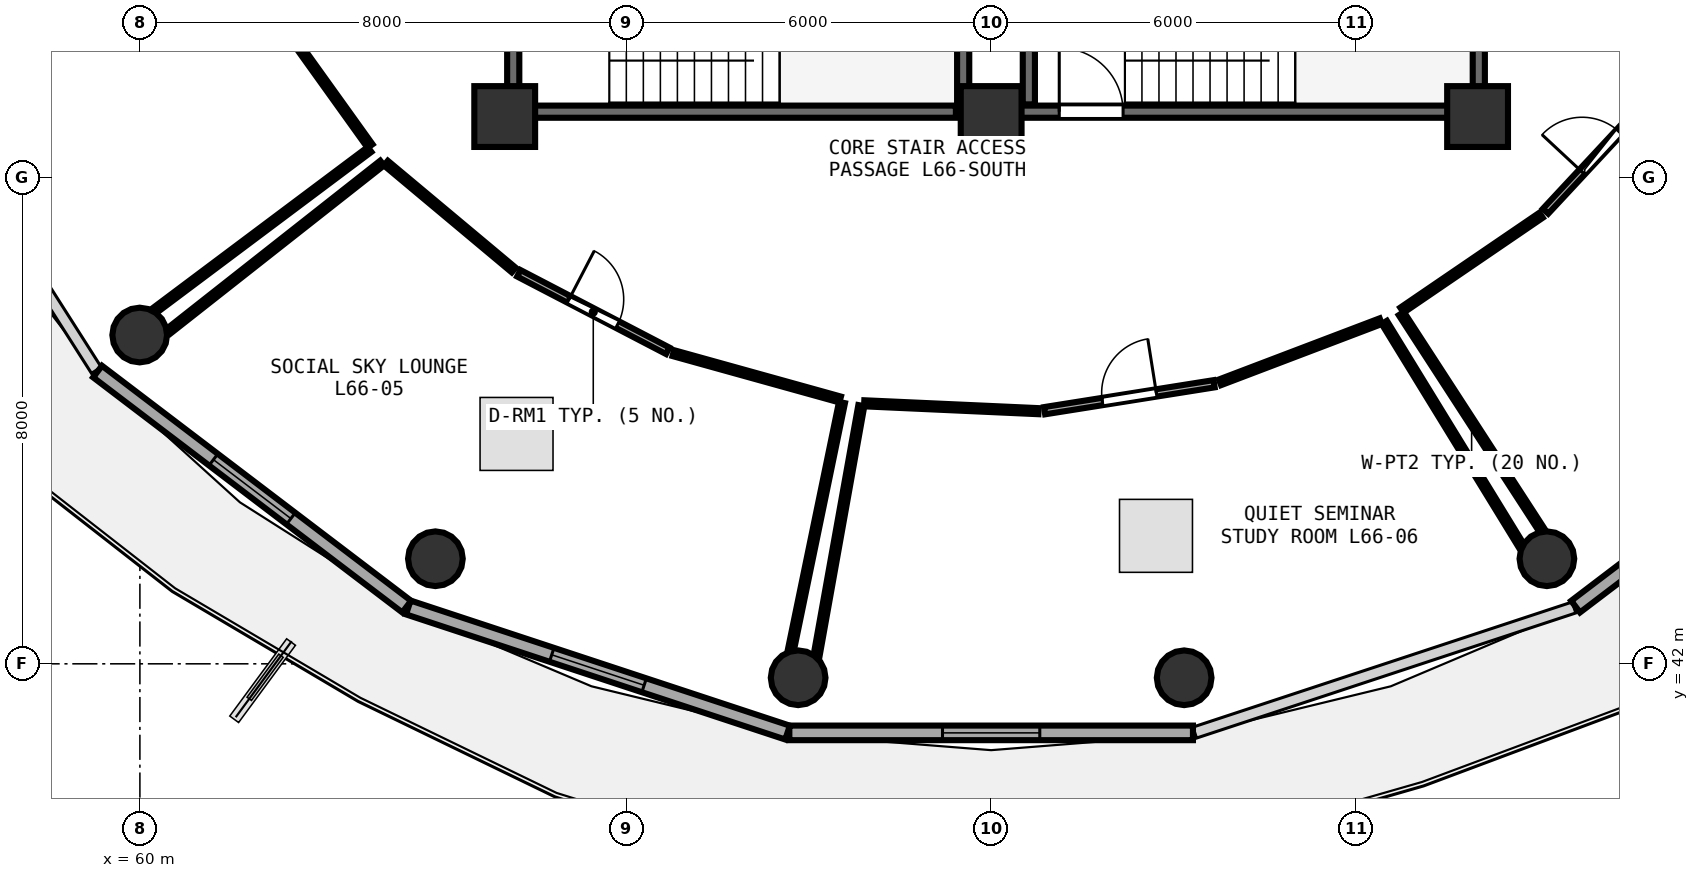
"""IFC4 building model, lengths in metres.
Left out: names, types, materials, properties, quantities, classifications, styles, units other than length and angle.
Written with IfcOpenShell. Run it as: python <this file> out.ifc"""

import sys

from ifc_helpers import new_model, si_unit, direction, frame, frame_2d, origin, origin_2d, place, context, subcontext, project, spatial, rectangle, circle, extrude, element, fill, save


model = new_model("IFC4")
c1 = context("Model", 3, precision=1e-05, world=origin(), true_north=direction((0.0, 1.0)))
c2 = subcontext(c1, "Body", "Model", "MODEL_VIEW")
j1 = project(units=[si_unit("LENGTHUNIT", "METRE"), si_unit("PLANEANGLEUNIT", "RADIAN")], contexts=[c1])
p1 = place(None, origin())
s1 = spatial("IfcSite", under=j1, at=p1, CompositionType="ELEMENT")
p2 = place(p1, origin())
s2 = spatial("IfcBuilding", under=s1, at=p2, CompositionType="ELEMENT")
p3 = place(p2, frame((0.0, 0.0, 259.95)))
s3 = spatial("IfcBuildingStorey", under=s2, at=p3, CompositionType="ELEMENT", Elevation=259.95)
for number, where, z_axis, x_axis in (
    (1, (66.0, 51.0, 0.0), (0.0, 0.0, 1.0), (1.0, 0.0, 0.0)),
    (2, (74.0, 51.0, 0.0), (0.0, 0.0, 1.0), (1.0, 0.0, 0.0)),
    (3, (82.0, 51.0, 0.0), (0.0, 0.0, 1.0), (1.0, 0.0, 0.0)),
):
    element("IfcColumn", number, at=place(p3, frame(where, z_axis=z_axis, x_axis=x_axis)), inside=s3, PredefinedType="PILASTER", context=c2, shape_type="SweptSolid", body=[
        extrude(rectangle(XDim=1.0, YDim=1.0, at=origin_2d()), origin(), (0.0, 0.0, 1.0), 3.75),
    ])
for number, where, z_axis, x_axis in (
    (4, (59.997, 47.407, 0.0), (0.0, 0.0, 1.0), (1.0, 0.0, 0.0)),
    (5, (64.86, 43.728, 0.0), (0.0, 0.0, 1.0), (1.0, 0.0, 0.0)),
    (6, (70.826, 41.771, 0.0), (0.0, 0.0, 1.0), (1.0, 0.0, 0.0)),
    (7, (77.174, 41.771, 0.0), (0.0, 0.0, 1.0), (1.0, 0.0, 0.0)),
    (8, (83.14, 43.728, 0.0), (0.0, 0.0, 1.0), (1.0, 0.0, 0.0)),
):
    element("IfcColumn", number, at=place(p3, frame(where, z_axis=z_axis, x_axis=x_axis)), inside=s3, PredefinedType="COLUMN", context=c2, shape_type="SweptSolid", body=[
        extrude(circle(Radius=0.45, at=origin_2d()), origin(), (0.0, 0.0, 1.0), 3.75),
    ])
p4 = place(p3, frame((59.304, 46.806, 0.0), z_axis=(0.0, 0.0, 1.0), x_axis=(0.796010444211, -0.605282886514, 0.0)))
e9 = element("IfcWall", 9, at=p4, inside=s3, PredefinedType="SOLIDWALL", context=c2, shape_type="SweptSolid", body=[
    extrude(rectangle(XDim=6.387, YDim=0.24, at=frame_2d((3.194, 0.0))), origin(), (0.0, 0.0, 1.0), 3.475),
])
p5 = place(p4, frame((2.394, 0.0, 0.85)))
e10 = element("IfcOpeningElement", 10, at=p5, cuts=e9, PredefinedType="OPENING", context=c2, shape_type="SweptSolid", body=[
    extrude(rectangle(XDim=1.6, YDim=1.45, at=frame_2d((0.8, 0.725))), frame((0.0, 0.13, 0.0), z_axis=(0.0, -1.0, 0.0), x_axis=(1.0, 0.0, 0.0)), (0.0, 0.0, 1.0), 0.26),
])
p6 = place(p3, frame((64.414, 42.927, 0.0), z_axis=(0.0, 0.0, 1.0), x_axis=(0.949663708393, -0.313271193954, 0.0)))
e11 = element("IfcWall", 11, at=p6, inside=s3, PredefinedType="SOLIDWALL", context=c2, shape_type="SweptSolid", body=[
    extrude(rectangle(XDim=6.568, YDim=0.24, at=frame_2d((3.284, 0.0))), origin(), (0.0, 0.0, 1.0), 3.475),
])
p7 = place(p6, frame((2.484, 0.0, 0.85)))
e12 = element("IfcOpeningElement", 12, at=p7, cuts=e11, PredefinedType="OPENING", context=c2, shape_type="SweptSolid", body=[
    extrude(rectangle(XDim=1.6, YDim=1.45, at=frame_2d((0.8, 0.725))), frame((0.0, 0.13, 0.0), z_axis=(0.0, -1.0, 0.0), x_axis=(1.0, 0.0, 0.0)), (0.0, 0.0, 1.0), 0.26),
])
p8 = place(p3, frame((70.681, 40.864, 0.0), z_axis=(0.0, 0.0, 1.0), x_axis=(1.0, 0.0, 0.0)))
e13 = element("IfcWall", 13, at=p8, inside=s3, PredefinedType="SOLIDWALL", context=c2, shape_type="SweptSolid", body=[
    extrude(rectangle(XDim=6.638, YDim=0.24, at=frame_2d((3.319, 0.0))), origin(), (0.0, 0.0, 1.0), 3.475),
])
p9 = place(p8, frame((2.519, 0.0, 0.85)))
e14 = element("IfcOpeningElement", 14, at=p9, cuts=e13, PredefinedType="OPENING", context=c2, shape_type="SweptSolid", body=[
    extrude(rectangle(XDim=1.6, YDim=1.45, at=frame_2d((0.8, 0.725))), frame((0.0, 0.13, 0.0), z_axis=(0.0, -1.0, 0.0), x_axis=(1.0, 0.0, 0.0)), (0.0, 0.0, 1.0), 0.26),
])
p10 = place(p3, frame((83.612, 42.94, 0.0), z_axis=(0.0, 0.0, 1.0), x_axis=(0.796010444211, 0.605282886514, 0.0)))
e15 = element("IfcWall", 15, at=p10, inside=s3, PredefinedType="SOLIDWALL", context=c2, shape_type="SweptSolid", body=[
    extrude(rectangle(XDim=6.387, YDim=0.24, at=frame_2d((3.194, 0.0))), origin(), (0.0, 0.0, 1.0), 3.475),
])
p11 = place(p10, frame((2.394, 0.0, 0.85)))
e16 = element("IfcOpeningElement", 16, at=p11, cuts=e15, PredefinedType="OPENING", context=c2, shape_type="SweptSolid", body=[
    extrude(rectangle(XDim=1.6, YDim=1.45, at=frame_2d((0.8, 0.725))), frame((0.0, 0.13, 0.0), z_axis=(0.0, -1.0, 0.0), x_axis=(1.0, 0.0, 0.0)), (0.0, 0.0, 1.0), 0.26),
])
p12 = place(p3, frame((74.0, 51.08, 0.0), z_axis=(0.0, 0.0, 1.0), x_axis=(1.0, 0.0, 0.0)))
e17 = element("IfcWall", 17, at=p12, inside=s3, PredefinedType="SHEAR", context=c2, shape_type="SweptSolid", body=[
    extrude(rectangle(XDim=7.9, YDim=0.2, at=frame_2d((3.95, 0.0))), origin(), (0.0, 0.0, 1.0), 3.49),
])
p13 = place(p12, frame((1.12, 0.0, 0.0)))
e18 = element("IfcOpeningElement", 18, at=p13, cuts=e17, PredefinedType="OPENING", context=c2, shape_type="SweptSolid", body=[
    extrude(rectangle(XDim=1.05, YDim=2.1, at=frame_2d((0.525, 1.05))), frame((0.0, 0.11, 0.0), z_axis=(0.0, -1.0, 0.0), x_axis=(1.0, 0.0, 0.0)), (0.0, 0.0, 1.0), 0.22),
])
for number, where, z_axis, x_axis in (
    (19, (82.02, 51.2, 0.0), (0.0, 0.0, 1.0), (0.0, 1.0, 0.0)),
    (20, (74.62, 54.27, 0.0), (0.0, 0.0, 1.0), (0.0, -1.0, 0.0)),
):
    element("IfcWall", number, at=place(p3, frame(where, z_axis=z_axis, x_axis=x_axis)), inside=s3, PredefinedType="SHEAR", context=c2, shape_type="SweptSolid", body=[
        extrude(rectangle(XDim=3.07, YDim=0.2, at=frame_2d((1.535, 0.0))), origin(), (0.0, 0.0, 1.0), 3.49),
    ])
p14 = place(p3, frame((66.26, 51.08, 0.0), z_axis=(0.0, 0.0, 1.0), x_axis=(1.0, 0.0, 0.0)))
e21 = element("IfcWall", 21, at=p14, inside=s3, PredefinedType="SHEAR", context=c2, shape_type="SweptSolid", body=[
    extrude(rectangle(XDim=7.16, YDim=0.2, at=frame_2d((3.58, 0.0))), origin(), (0.0, 0.0, 1.0), 3.49),
])
p15 = place(p3, frame((73.54, 51.2, 0.0), z_axis=(0.0, 0.0, 1.0), x_axis=(0.0, 1.0, 0.0)))
e22 = element("IfcWall", 22, at=p15, inside=s3, PredefinedType="SHEAR", context=c2, shape_type="SweptSolid", body=[
    extrude(rectangle(XDim=3.07, YDim=0.2, at=frame_2d((1.535, 0.0))), origin(), (0.0, 0.0, 1.0), 3.49),
])
p16 = place(p3, frame((66.14, 54.27, 0.0), z_axis=(0.0, 0.0, 1.0), x_axis=(0.0, -1.0, 0.0)))
e23 = element("IfcWall", 23, at=p16, inside=s3, PredefinedType="SHEAR", context=c2, shape_type="SweptSolid", body=[
    extrude(rectangle(XDim=3.07, YDim=0.2, at=frame_2d((1.535, 0.0))), origin(), (0.0, 0.0, 1.0), 3.49),
])
p17 = place(p16, frame((1.01, 0.0, 0.0)))
e24 = element("IfcOpeningElement", 24, at=p17, cuts=e23, PredefinedType="OPENING", context=c2, shape_type="SweptSolid", body=[
    extrude(rectangle(XDim=1.05, YDim=2.1, at=frame_2d((0.525, 1.05))), frame((0.0, 0.11, 0.0), z_axis=(0.0, -1.0, 0.0), x_axis=(1.0, 0.0, 0.0)), (0.0, 0.0, 1.0), 0.22),
])
p18 = place(p3, frame((66.232, 48.422, 0.0), z_axis=(0.0, 0.0, 1.0), x_axis=(0.887021247279, -0.461728607382, 0.0)))
e25 = element("IfcWall", 25, at=p18, inside=s3, PredefinedType="PARTITIONING", context=c2, shape_type="SweptSolid", body=[
    extrude(rectangle(XDim=2.761, YDim=0.12, at=frame_2d((1.38, 0.0))), origin(), (0.0, 0.0, 1.0), 3.235),
])
p19 = place(p18, frame((0.93, 0.0, 0.0)))
e26 = element("IfcOpeningElement", 26, at=p19, cuts=e25, PredefinedType="OPENING", context=c2, shape_type="SweptSolid", body=[
    extrude(rectangle(XDim=0.9, YDim=2.08, at=frame_2d((0.45, 1.04))), frame((0.0, 0.07, 0.0), z_axis=(0.0, -1.0, 0.0), x_axis=(1.0, 0.0, 0.0)), (0.0, 0.0, 1.0), 0.14),
])
p20 = place(p3, frame((74.878, 46.162, 0.0), z_axis=(0.0, 0.0, 1.0), x_axis=(0.987593415231, 0.157032627796, 0.0)))
e27 = element("IfcWall", 27, at=p20, inside=s3, PredefinedType="PARTITIONING", context=c2, shape_type="SweptSolid", body=[
    extrude(rectangle(XDim=2.823, YDim=0.12, at=frame_2d((1.412, 0.0))), origin(), (0.0, 0.0, 1.0), 3.075),
])
p21 = place(p20, frame((0.962, 0.0, 0.0)))
e28 = element("IfcOpeningElement", 28, at=p21, cuts=e27, PredefinedType="OPENING", context=c2, shape_type="SweptSolid", body=[
    extrude(rectangle(XDim=0.9, YDim=2.08, at=frame_2d((0.45, 1.04))), frame((0.0, 0.07, 0.0), z_axis=(0.0, -1.0, 0.0), x_axis=(1.0, 0.0, 0.0)), (0.0, 0.0, 1.0), 0.14),
])
p22 = place(p3, frame((83.118, 49.443, 0.0), z_axis=(0.0, 0.0, 1.0), x_axis=(0.681315269885, 0.731990097625, 0.0)))
e29 = element("IfcWall", 29, at=p22, inside=s3, PredefinedType="PARTITIONING", context=c2, shape_type="SweptSolid", body=[
    extrude(rectangle(XDim=2.664, YDim=0.12, at=frame_2d((1.332, 0.0))), origin(), (0.0, 0.0, 1.0), 3.075),
])
p23 = place(p22, frame((0.882, 0.0, 0.0)))
e30 = element("IfcOpeningElement", 30, at=p23, cuts=e29, PredefinedType="OPENING", context=c2, shape_type="SweptSolid", body=[
    extrude(rectangle(XDim=0.9, YDim=2.08, at=frame_2d((0.45, 1.04))), frame((0.0, 0.07, 0.0), z_axis=(0.0, -1.0, 0.0), x_axis=(1.0, 0.0, 0.0)), (0.0, 0.0, 1.0), 0.14),
])
p24 = place(p3, frame((62.23, 52.684, 0.0), z_axis=(0.0, 0.0, 1.0), x_axis=(0.582725386778, -0.812669135383, 0.0)))
e31 = element("IfcWall", 31, at=p24, inside=s3, PredefinedType="PARTITIONING", context=c2, shape_type="SweptSolid", body=[
    extrude(rectangle(XDim=2.669, YDim=0.1, at=frame_2d((1.334, 0.0))), origin(), (0.0, 0.0, 1.0), 3.075),
])
p25 = place(p3, frame((63.777, 50.458, 0.0), z_axis=(0.0, 0.0, 1.0), x_axis=(-0.800384816546, -0.599486568191, 0.0)))
e32 = element("IfcWall", 32, at=p25, inside=s3, PredefinedType="PARTITIONING", context=c2, shape_type="SweptSolid", body=[
    extrude(rectangle(XDim=4.414, YDim=0.1, at=frame_2d((2.207, 0.0))), origin(), (0.0, 0.0, 1.0), 3.175),
])
p26 = place(p3, frame((64.046, 50.234, 0.0), z_axis=(0.0, 0.0, 1.0), x_axis=(0.767022676895, -0.641619991216, 0.0)))
e33 = element("IfcWall", 33, at=p26, inside=s3, PredefinedType="PARTITIONING", context=c2, shape_type="SweptSolid", body=[
    extrude(rectangle(XDim=2.741, YDim=0.1, at=frame_2d((1.371, 0.0))), origin(), (0.0, 0.0, 1.0), 3.075),
])
p27 = place(p3, frame((68.772, 47.109, 0.0), z_axis=(0.0, 0.0, 1.0), x_axis=(0.963478601256, -0.267785333659, 0.0)))
e34 = element("IfcWall", 34, at=p27, inside=s3, PredefinedType="PARTITIONING", context=c2, shape_type="SweptSolid", body=[
    extrude(rectangle(XDim=2.848, YDim=0.1, at=frame_2d((1.424, 0.0))), origin(), (0.0, 0.0, 1.0), 3.48),
])
p28 = place(p3, frame((71.547, 46.297, 0.0), z_axis=(0.0, 0.0, 1.0), x_axis=(-0.202308141573, -0.979321916355, 0.0)))
e35 = element("IfcWall", 35, at=p28, inside=s3, PredefinedType="PARTITIONING", context=c2, shape_type="SweptSolid", body=[
    extrude(rectangle(XDim=4.153, YDim=0.1, at=frame_2d((2.076, 0.0))), origin(), (0.0, 0.0, 1.0), 3.175),
])
p29 = place(p3, frame((60.468, 47.468, 0.0), z_axis=(0.0, 0.0, 1.0), x_axis=(0.785736749878, 0.618561039745, 0.0)))
e36 = element("IfcWall", 36, at=p29, inside=s3, PredefinedType="PARTITIONING", context=c2, shape_type="SweptSolid", body=[
    extrude(rectangle(XDim=4.475, YDim=0.1, at=frame_2d((2.237, 0.0))), origin(), (0.0, 0.0, 1.0), 3.075),
])
p30 = place(p3, frame((71.912, 46.284, 0.0), z_axis=(0.0, 0.0, 1.0), x_axis=(0.998983047325, -0.045087372484, 0.0)))
e37 = element("IfcWall", 37, at=p30, inside=s3, PredefinedType="PARTITIONING", context=c2, shape_type="SweptSolid", body=[
    extrude(rectangle(XDim=2.87, YDim=0.1, at=frame_2d((1.435, 0.0))), origin(), (0.0, 0.0, 1.0), 3.075),
])
p31 = place(p3, frame((77.763, 46.629, 0.0), z_axis=(0.0, 0.0, 1.0), x_axis=(0.934691278896, 0.355460564839, 0.0)))
e38 = element("IfcWall", 38, at=p31, inside=s3, PredefinedType="PARTITIONING", context=c2, shape_type="SweptSolid", body=[
    extrude(rectangle(XDim=2.829, YDim=0.1, at=frame_2d((1.415, 0.0))), origin(), (0.0, 0.0, 1.0), 3.48),
])
p32 = place(p3, frame((80.466, 47.615, 0.0), z_axis=(0.0, 0.0, 1.0), x_axis=(0.522784059663, -0.852465147066, 0.0)))
e39 = element("IfcWall", 39, at=p32, inside=s3, PredefinedType="PARTITIONING", context=c2, shape_type="SweptSolid", body=[
    extrude(rectangle(XDim=4.306, YDim=0.1, at=frame_2d((2.153, 0.0))), origin(), (0.0, 0.0, 1.0), 3.175),
])
p33 = place(p3, frame((71.129, 42.136, 0.0), z_axis=(0.0, 0.0, 1.0), x_axis=(0.176199339585, 0.984354505618, 0.0)))
e40 = element("IfcWall", 40, at=p33, inside=s3, PredefinedType="PARTITIONING", context=c2, shape_type="SweptSolid", body=[
    extrude(rectangle(XDim=4.176, YDim=0.1, at=frame_2d((2.088, 0.0))), origin(), (0.0, 0.0, 1.0), 3.075),
])
p34 = place(p3, frame((80.757, 47.816, 0.0), z_axis=(0.0, 0.0, 1.0), x_axis=(0.826087380575, 0.563542047814, 0.0)))
e41 = element("IfcWall", 41, at=p34, inside=s3, PredefinedType="PARTITIONING", context=c2, shape_type="SweptSolid", body=[
    extrude(rectangle(XDim=2.768, YDim=0.1, at=frame_2d((1.384, 0.0))), origin(), (0.0, 0.0, 1.0), 3.075),
])
p35 = place(p3, frame((83.058, 44.196, 0.0), z_axis=(0.0, 0.0, 1.0), x_axis=(-0.544234825024, 0.838932926539, 0.0)))
e42 = element("IfcWall", 42, at=p35, inside=s3, PredefinedType="PARTITIONING", context=c2, shape_type="SweptSolid", body=[
    extrude(rectangle(XDim=4.249, YDim=0.1, at=frame_2d((2.125, 0.0))), origin(), (0.0, 0.0, 1.0), 3.075),
])
p36 = place(p5, origin())
e43 = element("IfcWindow", 43, at=p36, inside=s3, PartitioningType="SINGLE_PANEL", PredefinedType="WINDOW", context=c2, shape_type="SweptSolid", body=[
    extrude(rectangle(XDim=1.6, YDim=1.45, at=frame_2d((0.8, 0.725))), frame((0.0, 0.03, 0.0), z_axis=(0.0, -1.0, 0.0), x_axis=(1.0, 0.0, 0.0)), (0.0, 0.0, 1.0), 0.06),
])
fill(e10, e43)
p37 = place(p7, origin())
e44 = element("IfcWindow", 44, at=p37, inside=s3, PartitioningType="SINGLE_PANEL", PredefinedType="WINDOW", context=c2, shape_type="SweptSolid", body=[
    extrude(rectangle(XDim=1.6, YDim=1.45, at=frame_2d((0.8, 0.725))), frame((0.0, 0.03, 0.0), z_axis=(0.0, -1.0, 0.0), x_axis=(1.0, 0.0, 0.0)), (0.0, 0.0, 1.0), 0.06),
])
fill(e12, e44)
p38 = place(p9, origin())
e45 = element("IfcWindow", 45, at=p38, inside=s3, PartitioningType="SINGLE_PANEL", PredefinedType="WINDOW", context=c2, shape_type="SweptSolid", body=[
    extrude(rectangle(XDim=1.6, YDim=1.45, at=frame_2d((0.8, 0.725))), frame((0.0, 0.03, 0.0), z_axis=(0.0, -1.0, 0.0), x_axis=(1.0, 0.0, 0.0)), (0.0, 0.0, 1.0), 0.06),
])
fill(e14, e45)
p39 = place(p13, origin())
e46 = element("IfcDoor", 46, at=p39, inside=s3, OperationType="SINGLE_SWING_LEFT", PredefinedType="DOOR", context=c2, shape_type="SweptSolid", body=[
    extrude(rectangle(XDim=1.05, YDim=2.1, at=frame_2d((0.525, 1.05))), frame((0.0, 0.025, 0.0), z_axis=(0.0, -1.0, 0.0), x_axis=(1.0, 0.0, 0.0)), (0.0, 0.0, 1.0), 0.05),
])
fill(e18, e46)
p40 = place(p19, origin())
e47 = element("IfcDoor", 47, at=p40, inside=s3, OperationType="SINGLE_SWING_LEFT", PredefinedType="DOOR", context=c2, shape_type="SweptSolid", body=[
    extrude(rectangle(XDim=0.9, YDim=2.08, at=frame_2d((0.45, 1.04))), frame((0.0, 0.025, 0.0), z_axis=(0.0, -1.0, 0.0), x_axis=(1.0, 0.0, 0.0)), (0.0, 0.0, 1.0), 0.05),
])
fill(e26, e47)
p41 = place(p21, origin())
e48 = element("IfcDoor", 48, at=p41, inside=s3, OperationType="SINGLE_SWING_RIGHT", PredefinedType="DOOR", context=c2, shape_type="SweptSolid", body=[
    extrude(rectangle(XDim=0.9, YDim=2.08, at=frame_2d((0.45, 1.04))), frame((0.0, 0.025, 0.0), z_axis=(0.0, -1.0, 0.0), x_axis=(1.0, 0.0, 0.0)), (0.0, 0.0, 1.0), 0.05),
])
fill(e28, e48)
p42 = place(p23, origin())
e49 = element("IfcDoor", 49, at=p42, inside=s3, OperationType="SINGLE_SWING_LEFT", PredefinedType="DOOR", context=c2, shape_type="SweptSolid", body=[
    extrude(rectangle(XDim=0.9, YDim=2.08, at=frame_2d((0.45, 1.04))), frame((0.0, 0.025, 0.0), z_axis=(0.0, -1.0, 0.0), x_axis=(1.0, 0.0, 0.0)), (0.0, 0.0, 1.0), 0.05),
])
fill(e30, e49)
save(model, sys.argv[1])
